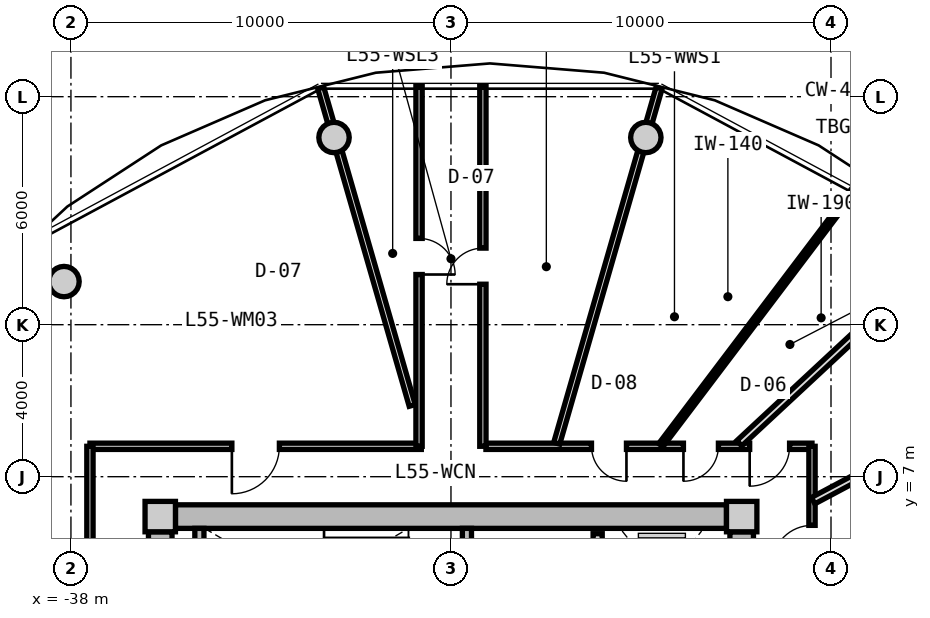
"""IFC4 building model, lengths in metres.
Left out: names, types, materials, properties, quantities, classifications, styles, units other than length and angle.
Written with IfcOpenShell. Run it as: python <this file> out.ifc"""

import sys

from ifc_helpers import new_model, si_unit, direction, frame, frame_2d, origin, origin_2d, place, context, subcontext, project, spatial, rectangle, circle, extrude, source, transform, mapped, element, fill, save


model = new_model("IFC4")
c1 = context("Model", 3, precision=1e-05, world=origin(), true_north=direction((0.0, 1.0)))
c2 = subcontext(c1, "Body", "Model", "MODEL_VIEW")
j1 = project(units=[si_unit("LENGTHUNIT", "METRE"), si_unit("PLANEANGLEUNIT", "RADIAN")], contexts=[c1])
p1 = place(None, origin())
s1 = spatial("IfcSite", under=j1, at=p1, CompositionType="ELEMENT")
p2 = place(p1, origin())
s2 = spatial("IfcBuilding", under=s1, at=p2, CompositionType="ELEMENT")
p3 = place(p2, frame((0.0, 0.0, 177.0)))
s3 = spatial("IfcBuildingStorey", under=s2, at=p3, CompositionType="ELEMENT", Elevation=177.0)
m1 = source(origin(), c2, "Body", "SweptSolid", [
    extrude(rectangle(XDim=0.8, YDim=0.8, at=origin_2d()), origin(), (0.0, 0.0, 1.0), 3.05),
])
for number, where, z_axis, x_axis in (
    (1, (-20.35, 5.95, 0.0), (0.0, 0.0, 1.0), (1.0, 0.0, 0.0)),
    (2, (-35.65, 5.95, 0.0), (0.0, 0.0, 1.0), (1.0, 0.0, 0.0)),
):
    element("IfcColumn", number, at=place(p3, frame(where, z_axis=z_axis, x_axis=x_axis)), inside=s3, PredefinedType="COLUMN", context=c2, shape_type="MappedRepresentation", body=[
        mapped(m1, transform((0.0, 0.0, 0.0), x_axis=(1.0, 0.0, 0.0), y_axis=(0.0, 1.0, 0.0), z_axis=(0.0, 0.0, 1.0), scale=1.0)),
    ])
m2 = source(origin(), c2, "Body", "SweptSolid", [
    extrude(rectangle(XDim=14.5, YDim=0.62, at=frame_2d((7.25, 0.0))), origin(), (0.0, 0.0, 1.0), 2.81),
])
p4 = place(p3, frame((-35.25, 5.95, 0.0), z_axis=(0.0, 0.0, 1.0), x_axis=(1.0, 0.0, 0.0)))
e3 = element("IfcWall", 3, at=p4, inside=s3, PredefinedType="SHEAR", context=c2, shape_type="MappedRepresentation", body=[
    mapped(m2, transform((0.0, 0.0, 0.0), x_axis=(1.0, 0.0, 0.0), y_axis=(0.0, 1.0, 0.0), z_axis=(0.0, 0.0, 1.0), scale=1.0)),
])
m3 = source(origin(), c2, "Body", "SweptSolid", [
    extrude(rectangle(XDim=11.1, YDim=0.62, at=frame_2d((5.55, 0.0))), origin(), (0.0, 0.0, 1.0), 2.81),
])
p5 = place(p3, frame((-35.65, -5.55, 0.0), z_axis=(0.0, 0.0, 1.0), x_axis=(0.0, 1.0, 0.0)))
e4 = element("IfcWall", 4, at=p5, inside=s3, PredefinedType="SHEAR", context=c2, shape_type="MappedRepresentation", body=[
    mapped(m3, transform((0.0, 0.0, 0.0), x_axis=(1.0, 0.0, 0.0), y_axis=(0.0, 1.0, 0.0), z_axis=(0.0, 0.0, 1.0), scale=1.0)),
])
p6 = place(p5, frame((3.8, 0.0, 0.0)))
e5 = element("IfcOpeningElement", 5, at=p6, cuts=e4, PredefinedType="OPENING", context=c2, shape_type="SweptSolid", body=[
    extrude(rectangle(XDim=1.2, YDim=2.15, at=frame_2d((0.6, 1.075))), frame((0.0, 0.32, 0.0), z_axis=(0.0, -1.0, 0.0), x_axis=(1.0, 0.0, 0.0)), (0.0, 0.0, 1.0), 0.64),
])
p7 = place(p3, frame((-20.35, 5.55, 0.0), z_axis=(0.0, 0.0, 1.0), x_axis=(0.0, -1.0, 0.0)))
e6 = element("IfcWall", 6, at=p7, inside=s3, PredefinedType="SHEAR", context=c2, shape_type="MappedRepresentation", body=[
    mapped(m3, transform((0.0, 0.0, 0.0), x_axis=(1.0, 0.0, 0.0), y_axis=(0.0, 1.0, 0.0), z_axis=(0.0, 0.0, 1.0), scale=1.0)),
])
p8 = place(p7, frame((5.65, 0.0, 0.0)))
e7 = element("IfcOpeningElement", 7, at=p8, cuts=e6, PredefinedType="OPENING", context=c2, shape_type="SweptSolid", body=[
    extrude(rectangle(XDim=1.2, YDim=2.15, at=frame_2d((0.6, 1.075))), frame((0.0, 0.32, 0.0), z_axis=(0.0, -1.0, 0.0), x_axis=(1.0, 0.0, 0.0)), (0.0, 0.0, 1.0), 0.64),
])
m4 = source(origin(), c2, "Body", "SweptSolid", [
    extrude(circle(Radius=0.4, at=origin_2d()), origin(), (0.0, 0.0, 1.0), 3.05),
])
for number, where, z_axis, x_axis in (
    (8, (-22.873, 15.926, 0.0), (0.0, 0.0, 1.0), (1.0, 0.0, 0.0)),
    (9, (-31.077, 15.926, 0.0), (0.0, 0.0, 1.0), (1.0, 0.0, 0.0)),
    (10, (-38.183, 12.135, 0.0), (0.0, 0.0, 1.0), (1.0, 0.0, 0.0)),
):
    element("IfcColumn", number, at=place(p3, frame(where, z_axis=z_axis, x_axis=x_axis)), inside=s3, PredefinedType="COLUMN", context=c2, shape_type="MappedRepresentation", body=[
        mapped(m4, transform((0.0, 0.0, 0.0), x_axis=(1.0, 0.0, 0.0), y_axis=(0.0, 1.0, 0.0), z_axis=(0.0, 0.0, 1.0), scale=1.0)),
    ])
m5 = source(origin(), c2, "Body", "SweptSolid", [
    extrude(rectangle(XDim=3.19, YDim=0.24, at=frame_2d((1.595, 0.0))), origin(), (0.0, 0.0, 1.0), 2.81),
])
p9 = place(p3, frame((-34.62, 2.45, 0.0), z_axis=(0.0, 0.0, 1.0), x_axis=(0.0, 1.0, 0.0)))
e11 = element("IfcWall", 11, at=p9, inside=s3, PredefinedType="PARTITIONING", context=c2, shape_type="MappedRepresentation", body=[
    mapped(m5, transform((0.0, 0.0, 0.0), x_axis=(1.0, 0.0, 0.0), y_axis=(0.0, 1.0, 0.0), z_axis=(0.0, 0.0, 1.0), scale=1.0)),
])
p10 = place(p3, frame((-27.58, 2.45, 0.0), z_axis=(0.0, 0.0, 1.0), x_axis=(0.0, 1.0, 0.0)))
e12 = element("IfcWall", 12, at=p10, inside=s3, PredefinedType="PARTITIONING", context=c2, shape_type="MappedRepresentation", body=[
    mapped(m5, transform((0.0, 0.0, 0.0), x_axis=(1.0, 0.0, 0.0), y_axis=(0.0, 1.0, 0.0), z_axis=(0.0, 0.0, 1.0), scale=1.0)),
])
p11 = place(p10, frame((0.55, 0.0, 0.0)))
e13 = element("IfcOpeningElement", 13, at=p11, cuts=e12, PredefinedType="OPENING", context=c2, shape_type="SweptSolid", body=[
    extrude(rectangle(XDim=1.1, YDim=2.15, at=frame_2d((0.55, 1.075))), frame((0.0, 0.13, 0.0), z_axis=(0.0, -1.0, 0.0), x_axis=(1.0, 0.0, 0.0)), (0.0, 0.0, 1.0), 0.26),
])
m6 = source(origin(), c2, "Body", "SweptSolid", [
    extrude(rectangle(XDim=5.0, YDim=0.24, at=frame_2d((2.5, 0.0))), origin(), (0.0, 0.0, 1.0), 2.795),
])
p12 = place(p3, frame((-24.14, 0.5, 0.0), z_axis=(0.0, 0.0, 1.0), x_axis=(0.0, 1.0, 0.0)))
e14 = element("IfcWall", 14, at=p12, inside=s3, PredefinedType="PARTITIONING", context=c2, shape_type="MappedRepresentation", body=[
    mapped(m6, transform((0.0, 0.0, 0.0), x_axis=(1.0, 0.0, 0.0), y_axis=(0.0, 1.0, 0.0), z_axis=(0.0, 0.0, 1.0), scale=1.0)),
])
p13 = place(p12, frame((3.05, 0.0, 0.0)))
e15 = element("IfcOpeningElement", 15, at=p13, cuts=e14, PredefinedType="OPENING", context=c2, shape_type="SweptSolid", body=[
    extrude(rectangle(XDim=1.3, YDim=2.2, at=frame_2d((0.65, 1.1))), frame((0.0, 0.13, 0.0), z_axis=(0.0, -1.0, 0.0), x_axis=(1.0, 0.0, 0.0)), (0.0, 0.0, 1.0), 0.26),
])
p14 = place(p12, frame((0.55, 0.0, 0.0)))
e16 = element("IfcOpeningElement", 16, at=p14, cuts=e14, PredefinedType="OPENING", context=c2, shape_type="SweptSolid", body=[
    extrude(rectangle(XDim=1.3, YDim=2.2, at=frame_2d((0.65, 1.1))), frame((0.0, 0.13, 0.0), z_axis=(0.0, -1.0, 0.0), x_axis=(1.0, 0.0, 0.0)), (0.0, 0.0, 1.0), 0.26),
])
m7 = source(origin(), c2, "Body", "SweptSolid", [
    extrude(rectangle(XDim=8.719, YDim=0.165, at=frame_2d((4.36, 0.0))), origin(), (0.0, 0.0, 1.0), 2.795),
])
p15 = place(p3, frame((-37.5, 7.8, 0.0), z_axis=(0.0, 0.0, 1.0), x_axis=(1.0, 0.0, 0.0)))
e17 = element("IfcWall", 17, at=p15, inside=s3, PredefinedType="PARTITIONING", context=c2, shape_type="MappedRepresentation", body=[
    mapped(m7, transform((0.0, 0.0, 0.0), x_axis=(1.0, 0.0, 0.0), y_axis=(0.0, 1.0, 0.0), z_axis=(0.0, 0.0, 1.0), scale=1.0)),
])
p16 = place(p15, frame((3.735, 0.0, 0.0)))
e18 = element("IfcOpeningElement", 18, at=p16, cuts=e17, PredefinedType="OPENING", context=c2, shape_type="SweptSolid", body=[
    extrude(rectangle(XDim=1.25, YDim=2.2, at=frame_2d((0.625, 1.1))), frame((0.0, 0.093, 0.0), z_axis=(0.0, -1.0, 0.0), x_axis=(1.0, 0.0, 0.0)), (0.0, 0.0, 1.0), 0.185),
])
m8 = source(origin(), c2, "Body", "SweptSolid", [
    extrude(rectangle(XDim=8.58, YDim=0.165, at=frame_2d((4.29, 0.0))), origin(), (0.0, 0.0, 1.0), 2.795),
])
p17 = place(p3, frame((-27.08, 7.8, 0.0), z_axis=(0.0, 0.0, 1.0), x_axis=(1.0, 0.0, 0.0)))
e19 = element("IfcWall", 19, at=p17, inside=s3, PredefinedType="PARTITIONING", context=c2, shape_type="MappedRepresentation", body=[
    mapped(m8, transform((0.0, 0.0, 0.0), x_axis=(1.0, 0.0, 0.0), y_axis=(0.0, 1.0, 0.0), z_axis=(0.0, 0.0, 1.0), scale=1.0)),
])
p18 = place(p17, frame((6.94, 0.0, 0.0)))
e20 = element("IfcOpeningElement", 20, at=p18, cuts=e19, PredefinedType="OPENING", context=c2, shape_type="SweptSolid", body=[
    extrude(rectangle(XDim=1.05, YDim=2.15, at=frame_2d((0.525, 1.075))), frame((0.0, 0.093, 0.0), z_axis=(0.0, -1.0, 0.0), x_axis=(1.0, 0.0, 0.0)), (0.0, 0.0, 1.0), 0.185),
])
p19 = place(p17, frame((5.197, 0.0, 0.0)))
e21 = element("IfcOpeningElement", 21, at=p19, cuts=e19, PredefinedType="OPENING", context=c2, shape_type="SweptSolid", body=[
    extrude(rectangle(XDim=0.92, YDim=2.1, at=frame_2d((0.46, 1.05))), frame((0.0, 0.093, 0.0), z_axis=(0.0, -1.0, 0.0), x_axis=(1.0, 0.0, 0.0)), (0.0, 0.0, 1.0), 0.185),
])
p20 = place(p17, frame((2.778, 0.0, 0.0)))
e22 = element("IfcOpeningElement", 22, at=p20, cuts=e19, PredefinedType="OPENING", context=c2, shape_type="SweptSolid", body=[
    extrude(rectangle(XDim=0.92, YDim=2.1, at=frame_2d((0.46, 1.05))), frame((0.0, 0.093, 0.0), z_axis=(0.0, -1.0, 0.0), x_axis=(1.0, 0.0, 0.0)), (0.0, 0.0, 1.0), 0.185),
])
m9 = source(origin(), c2, "Body", "SweptSolid", [
    extrude(rectangle(XDim=6.88, YDim=0.165, at=frame_2d((3.44, 0.0))), origin(), (0.0, 0.0, 1.0), 2.795),
])
p21 = place(p3, frame((-37.5, 0.92, 0.0), z_axis=(0.0, 0.0, 1.0), x_axis=(0.0, 1.0, 0.0)))
e23 = element("IfcWall", 23, at=p21, inside=s3, PredefinedType="PARTITIONING", context=c2, shape_type="MappedRepresentation", body=[
    mapped(m9, transform((0.0, 0.0, 0.0), x_axis=(1.0, 0.0, 0.0), y_axis=(0.0, 1.0, 0.0), z_axis=(0.0, 0.0, 1.0), scale=1.0)),
])
p22 = place(p3, frame((-18.5, 7.8, 0.0), z_axis=(0.0, 0.0, 1.0), x_axis=(0.0, -1.0, 0.0)))
e24 = element("IfcWall", 24, at=p22, inside=s3, PredefinedType="PARTITIONING", context=c2, shape_type="MappedRepresentation", body=[
    mapped(m9, transform((0.0, 0.0, 0.0), x_axis=(1.0, 0.0, 0.0), y_axis=(0.0, 1.0, 0.0), z_axis=(0.0, 0.0, 1.0), scale=1.0)),
])
p23 = place(p22, frame((2.081, 0.0, 0.0)))
e25 = element("IfcOpeningElement", 25, at=p23, cuts=e24, PredefinedType="OPENING", context=c2, shape_type="SweptSolid", body=[
    extrude(rectangle(XDim=1.05, YDim=2.15, at=frame_2d((0.525, 1.075))), frame((0.0, 0.093, 0.0), z_axis=(0.0, -1.0, 0.0), x_axis=(1.0, 0.0, 0.0)), (0.0, 0.0, 1.0), 0.185),
])
m10 = source(origin(), c2, "Body", "SweptSolid", [
    extrude(rectangle(XDim=9.73, YDim=0.165, at=frame_2d((4.865, 0.0))), origin(), (0.0, 0.0, 1.0), 2.345),
])
p24 = place(p3, frame((-25.217, 7.88, 0.0), z_axis=(0.0, 0.0, 1.0), x_axis=(0.27679492614, 0.960929013436, 0.0)))
e26 = element("IfcWall", 26, at=p24, inside=s3, PredefinedType="PARTITIONING", context=c2, shape_type="MappedRepresentation", body=[
    mapped(m10, transform((0.0, 0.0, 0.0), x_axis=(1.0, 0.0, 0.0), y_axis=(0.0, 1.0, 0.0), z_axis=(0.0, 0.0, 1.0), scale=1.0)),
])
m11 = source(origin(), c2, "Body", "SweptSolid", [
    extrude(rectangle(XDim=8.695, YDim=0.165, at=frame_2d((4.348, 0.0))), origin(), (0.0, 0.0, 1.0), 2.345),
])
p25 = place(p3, frame((-29.02, 8.875, 0.0), z_axis=(0.0, 0.0, 1.0), x_axis=(-0.276797231892, 0.960928349263, 0.0)))
e27 = element("IfcWall", 27, at=p25, inside=s3, PredefinedType="PARTITIONING", context=c2, shape_type="MappedRepresentation", body=[
    mapped(m11, transform((0.0, 0.0, 0.0), x_axis=(1.0, 0.0, 0.0), y_axis=(0.0, 1.0, 0.0), z_axis=(0.0, 0.0, 1.0), scale=1.0)),
])
m12 = source(origin(), c2, "Body", "SweptSolid", [
    extrude(rectangle(XDim=6.193, YDim=0.165, at=frame_2d((3.096, 0.0))), origin(), (0.0, 0.0, 1.0), 2.345),
])
p26 = place(p3, frame((-37.58, 4.419, 0.0), z_axis=(0.0, 0.0, 1.0), x_axis=(-0.970309243466, 0.241867674657, 0.0)))
e28 = element("IfcWall", 28, at=p26, inside=s3, PredefinedType="PARTITIONING", context=c2, shape_type="MappedRepresentation", body=[
    mapped(m12, transform((0.0, 0.0, 0.0), x_axis=(1.0, 0.0, 0.0), y_axis=(0.0, 1.0, 0.0), z_axis=(0.0, 0.0, 1.0), scale=1.0)),
])
m13 = source(origin(), c2, "Body", "SweptSolid", [
    extrude(rectangle(XDim=8.305, YDim=0.165, at=frame_2d((4.153, 0.0))), origin(), (0.0, 0.0, 1.0), 2.345),
])
p27 = place(p3, frame((-18.42, 3.908, 0.0), z_axis=(0.0, 0.0, 1.0), x_axis=(0.970309994378, 0.241864662175, 0.0)))
e29 = element("IfcWall", 29, at=p27, inside=s3, PredefinedType="PARTITIONING", context=c2, shape_type="MappedRepresentation", body=[
    mapped(m13, transform((0.0, 0.0, 0.0), x_axis=(1.0, 0.0, 0.0), y_axis=(0.0, 1.0, 0.0), z_axis=(0.0, 0.0, 1.0), scale=1.0)),
])
m14 = source(origin(), c2, "Body", "SweptSolid", [
    extrude(rectangle(XDim=9.48, YDim=0.165, at=frame_2d((4.74, 0.0))), origin(), (0.0, 0.0, 1.0), 2.795),
])
p28 = place(p3, frame((-28.84, 7.8, 0.0), z_axis=(0.0, 0.0, 1.0), x_axis=(0.0, 1.0, 0.0)))
e30 = element("IfcWall", 30, at=p28, inside=s3, PredefinedType="PARTITIONING", context=c2, shape_type="MappedRepresentation", body=[
    mapped(m14, transform((0.0, 0.0, 0.0), x_axis=(1.0, 0.0, 0.0), y_axis=(0.0, 1.0, 0.0), z_axis=(0.0, 0.0, 1.0), scale=1.0)),
])
p29 = place(p28, frame((4.521, 0.0, 0.0)))
e31 = element("IfcOpeningElement", 31, at=p29, cuts=e30, PredefinedType="OPENING", context=c2, shape_type="SweptSolid", body=[
    extrude(rectangle(XDim=0.95, YDim=2.1, at=frame_2d((0.475, 1.05))), frame((0.0, 0.093, 0.0), z_axis=(0.0, -1.0, 0.0), x_axis=(1.0, 0.0, 0.0)), (0.0, 0.0, 1.0), 0.185),
])
p30 = place(p3, frame((-27.16, 17.28, 0.0), z_axis=(0.0, 0.0, 1.0), x_axis=(0.0, -1.0, 0.0)))
e32 = element("IfcWall", 32, at=p30, inside=s3, PredefinedType="PARTITIONING", context=c2, shape_type="MappedRepresentation", body=[
    mapped(m14, transform((0.0, 0.0, 0.0), x_axis=(1.0, 0.0, 0.0), y_axis=(0.0, 1.0, 0.0), z_axis=(0.0, 0.0, 1.0), scale=1.0)),
])
p31 = place(p30, frame((4.265, 0.0, 0.0)))
e33 = element("IfcOpeningElement", 33, at=p31, cuts=e32, PredefinedType="OPENING", context=c2, shape_type="SweptSolid", body=[
    extrude(rectangle(XDim=0.95, YDim=2.1, at=frame_2d((0.475, 1.05))), frame((0.0, 0.093, 0.0), z_axis=(0.0, -1.0, 0.0), x_axis=(1.0, 0.0, 0.0)), (0.0, 0.0, 1.0), 0.185),
])
m15 = source(origin(), c2, "Body", "SweptSolid", [
    extrude(rectangle(XDim=7.648, YDim=0.19, at=frame_2d((3.824, 0.0))), origin(), (0.0, 0.0, 1.0), 2.345),
])
p32 = place(p3, frame((-20.413, 7.88, 0.0), z_axis=(0.0, 0.0, 1.0), x_axis=(0.732182665826, 0.681108320213, 0.0)))
e34 = element("IfcWall", 34, at=p32, inside=s3, PredefinedType="PARTITIONING", context=c2, shape_type="MappedRepresentation", body=[
    mapped(m15, transform((0.0, 0.0, 0.0), x_axis=(1.0, 0.0, 0.0), y_axis=(0.0, 1.0, 0.0), z_axis=(0.0, 0.0, 1.0), scale=1.0)),
])
m16 = source(origin(), c2, "Body", "SweptSolid", [
    extrude(rectangle(XDim=6.665, YDim=0.19, at=frame_2d((3.333, 0.0))), origin(), (0.0, 0.0, 1.0), 2.795),
])
p33 = place(p3, frame((-18.47, 6.37, 0.0), z_axis=(0.0, 0.0, 1.0), x_axis=(0.88263769619, 0.470053930166, 0.0)))
e35 = element("IfcWall", 35, at=p33, inside=s3, PredefinedType="PARTITIONING", context=c2, shape_type="MappedRepresentation", body=[
    mapped(m16, transform((0.0, 0.0, 0.0), x_axis=(1.0, 0.0, 0.0), y_axis=(0.0, 1.0, 0.0), z_axis=(0.0, 0.0, 1.0), scale=1.0)),
])
m17 = source(origin(), c2, "Body", "SweptSolid", [
    extrude(rectangle(XDim=8.359, YDim=0.14, at=frame_2d((4.18, 0.0))), origin(), (0.0, 0.0, 1.0), 2.795),
])
p34 = place(p3, frame((-22.477, 7.83, 0.0), z_axis=(0.0, 0.0, 1.0), x_axis=(0.603265985309, 0.797540062297, 0.0)))
e36 = element("IfcWall", 36, at=p34, inside=s3, PredefinedType="PARTITIONING", context=c2, shape_type="MappedRepresentation", body=[
    mapped(m17, transform((0.0, 0.0, 0.0), x_axis=(1.0, 0.0, 0.0), y_axis=(0.0, 1.0, 0.0), z_axis=(0.0, 0.0, 1.0), scale=1.0)),
])
m18 = source(origin(), c2, "Body", "SweptSolid", [
    extrude(rectangle(XDim=0.95, YDim=2.1, at=frame_2d((0.475, 1.05))), frame((0.0, 0.025, 0.0), z_axis=(0.0, -1.0, 0.0), x_axis=(1.0, 0.0, 0.0)), (0.0, 0.0, 1.0), 0.05),
])
p35 = place(p29, frame((0.95, 0.0, 0.0), z_axis=(0.0, 0.0, 1.0), x_axis=(-1.0, 0.0, 0.0)))
e37 = element("IfcDoor", 37, at=p35, inside=s3, OperationType="SINGLE_SWING_RIGHT", PredefinedType="DOOR", context=c2, shape_type="MappedRepresentation", body=[
    mapped(m18, transform((0.0, 0.0, 0.0), x_axis=(1.0, 0.0, 0.0), y_axis=(0.0, 1.0, 0.0), z_axis=(0.0, 0.0, 1.0), scale=1.0)),
])
fill(e31, e37)
p36 = place(p31, frame((0.95, 0.0, 0.0), z_axis=(0.0, 0.0, 1.0), x_axis=(-1.0, 0.0, 0.0)))
e38 = element("IfcDoor", 38, at=p36, inside=s3, OperationType="SINGLE_SWING_LEFT", PredefinedType="DOOR", context=c2, shape_type="MappedRepresentation", body=[
    mapped(m18, transform((0.0, 0.0, 0.0), x_axis=(1.0, 0.0, 0.0), y_axis=(0.0, 1.0, 0.0), z_axis=(0.0, 0.0, 1.0), scale=1.0)),
])
fill(e33, e38)
m19 = source(origin(), c2, "Body", "SweptSolid", [
    extrude(rectangle(XDim=1.05, YDim=2.15, at=frame_2d((0.525, 1.075))), frame((0.0, 0.025, 0.0), z_axis=(0.0, -1.0, 0.0), x_axis=(1.0, 0.0, 0.0)), (0.0, 0.0, 1.0), 0.05),
])
p37 = place(p23, frame((1.05, 0.0, 0.0), z_axis=(0.0, 0.0, 1.0), x_axis=(-1.0, 0.0, 0.0)))
e39 = element("IfcDoor", 39, at=p37, inside=s3, OperationType="SINGLE_SWING_LEFT", PredefinedType="DOOR", context=c2, shape_type="MappedRepresentation", body=[
    mapped(m19, transform((0.0, 0.0, 0.0), x_axis=(1.0, 0.0, 0.0), y_axis=(0.0, 1.0, 0.0), z_axis=(0.0, 0.0, 1.0), scale=1.0)),
])
fill(e25, e39)
p38 = place(p18, frame((1.05, 0.0, 0.0), z_axis=(0.0, 0.0, 1.0), x_axis=(-1.0, 0.0, 0.0)))
e40 = element("IfcDoor", 40, at=p38, inside=s3, OperationType="SINGLE_SWING_RIGHT", PredefinedType="DOOR", context=c2, shape_type="MappedRepresentation", body=[
    mapped(m19, transform((0.0, 0.0, 0.0), x_axis=(1.0, 0.0, 0.0), y_axis=(0.0, 1.0, 0.0), z_axis=(0.0, 0.0, 1.0), scale=1.0)),
])
fill(e20, e40)
m20 = source(origin(), c2, "Body", "SweptSolid", [
    extrude(rectangle(XDim=0.92, YDim=2.1, at=frame_2d((0.46, 1.05))), frame((0.0, 0.025, 0.0), z_axis=(0.0, -1.0, 0.0), x_axis=(1.0, 0.0, 0.0)), (0.0, 0.0, 1.0), 0.05),
])
p39 = place(p19, frame((0.92, 0.0, 0.0), z_axis=(0.0, 0.0, 1.0), x_axis=(-1.0, 0.0, 0.0)))
e41 = element("IfcDoor", 41, at=p39, inside=s3, OperationType="SINGLE_SWING_RIGHT", PredefinedType="DOOR", context=c2, shape_type="MappedRepresentation", body=[
    mapped(m20, transform((0.0, 0.0, 0.0), x_axis=(1.0, 0.0, 0.0), y_axis=(0.0, 1.0, 0.0), z_axis=(0.0, 0.0, 1.0), scale=1.0)),
])
fill(e21, e41)
p40 = place(p20, frame((0.92, 0.0, 0.0), z_axis=(0.0, 0.0, 1.0), x_axis=(-1.0, 0.0, 0.0)))
e42 = element("IfcDoor", 42, at=p40, inside=s3, OperationType="SINGLE_SWING_LEFT", PredefinedType="DOOR", context=c2, shape_type="MappedRepresentation", body=[
    mapped(m20, transform((0.0, 0.0, 0.0), x_axis=(1.0, 0.0, 0.0), y_axis=(0.0, 1.0, 0.0), z_axis=(0.0, 0.0, 1.0), scale=1.0)),
])
fill(e22, e42)
m21 = source(origin(), c2, "Body", "SweptSolid", [
    extrude(rectangle(XDim=1.25, YDim=2.2, at=frame_2d((0.625, 1.1))), frame((0.0, 0.025, 0.0), z_axis=(0.0, -1.0, 0.0), x_axis=(1.0, 0.0, 0.0)), (0.0, 0.0, 1.0), 0.05),
])
p41 = place(p16, frame((1.25, 0.0, 0.0), z_axis=(0.0, 0.0, 1.0), x_axis=(-1.0, 0.0, 0.0)))
e43 = element("IfcDoor", 43, at=p41, inside=s3, OperationType="SINGLE_SWING_RIGHT", PredefinedType="DOOR", context=c2, shape_type="MappedRepresentation", body=[
    mapped(m21, transform((0.0, 0.0, 0.0), x_axis=(1.0, 0.0, 0.0), y_axis=(0.0, 1.0, 0.0), z_axis=(0.0, 0.0, 1.0), scale=1.0)),
])
fill(e18, e43)
save(model, sys.argv[1])
